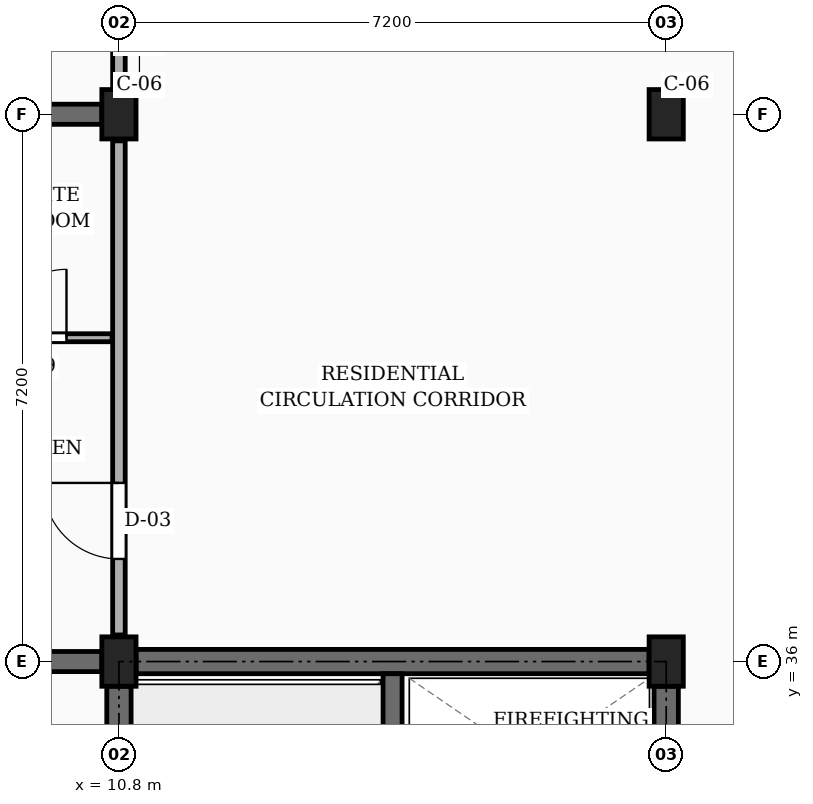
"""IFC4 building model, lengths in metres.
Left out: names, types, materials, properties, quantities, classifications, styles, units other than length and angle.
Written with IfcOpenShell. Run it as: python <this file> out.ifc"""

import sys

from ifc_helpers import new_model, si_unit, direction, frame, frame_2d, origin, origin_2d, place, context, subcontext, project, spatial, rectangle, extrude, element, fill, save


model = new_model("IFC4")
c1 = context("Model", 3, precision=1e-05, world=origin(), true_north=direction((0.0, 1.0)))
c2 = subcontext(c1, "Body", "Model", "MODEL_VIEW")
j1 = project(units=[si_unit("LENGTHUNIT", "METRE"), si_unit("PLANEANGLEUNIT", "RADIAN")], contexts=[c1])
p1 = place(None, origin())
s1 = spatial("IfcSite", under=j1, at=p1, CompositionType="ELEMENT")
p2 = place(p1, origin())
s2 = spatial("IfcBuilding", under=s1, at=p2, CompositionType="ELEMENT")
p3 = place(p2, frame((0.0, 0.0, 10.8)))
s3 = spatial("IfcBuildingStorey", under=s2, at=p3, CompositionType="ELEMENT", Elevation=10.8)
for number, where, z_axis, x_axis in (
    (1, (10.8, 36.0, 0.0), (0.0, 0.0, 1.0), (1.0, 0.0, 0.0)),
    (2, (10.8, 43.2, 0.0), (0.0, 0.0, 1.0), (1.0, 0.0, 0.0)),
    (3, (18.0, 36.0, 0.0), (0.0, 0.0, 1.0), (1.0, 0.0, 0.0)),
    (4, (18.0, 43.2, 0.0), (0.0, 0.0, 1.0), (1.0, 0.0, 0.0)),
):
    element("IfcColumn", number, at=place(p3, frame(where, z_axis=z_axis, x_axis=x_axis)), inside=s3, PredefinedType="COLUMN", context=c2, shape_type="SweptSolid", body=[
        extrude(rectangle(XDim=0.45, YDim=0.65, at=origin_2d()), origin(), (0.0, 0.0, 1.0), 3.15),
    ])
for number, where, z_axis, x_axis in (
    (5, (3.875, 36.0, 0.0), (0.0, 0.0, 1.0), (1.0, 0.0, 0.0)),
    (6, (3.875, 43.2, 0.0), (0.0, 0.0, 1.0), (1.0, 0.0, 0.0)),
):
    element("IfcWall", number, at=place(p3, frame(where, z_axis=z_axis, x_axis=x_axis)), inside=s3, PredefinedType="SOLIDWALL", context=c2, shape_type="SweptSolid", body=[
        extrude(rectangle(XDim=6.7, YDim=0.265, at=frame_2d((3.35, 0.0))), origin(), (0.0, 0.0, 1.0), 2.17),
    ])
p4 = place(p3, frame((10.8, 29.125, 0.0), z_axis=(0.0, 0.0, 1.0), x_axis=(0.0, 1.0, 0.0)))
e7 = element("IfcWall", 7, at=p4, inside=s3, PredefinedType="SHEAR", context=c2, shape_type="SweptSolid", body=[
    extrude(rectangle(XDim=6.55, YDim=0.32, at=frame_2d((3.275, 0.0))), origin(), (0.0, 0.0, 1.0), 2.87),
])
p5 = place(p3, frame((11.025, 36.0, 0.0), z_axis=(0.0, 0.0, 1.0), x_axis=(1.0, 0.0, 0.0)))
e8 = element("IfcWall", 8, at=p5, inside=s3, PredefinedType="SHEAR", context=c2, shape_type="SweptSolid", body=[
    extrude(rectangle(XDim=6.75, YDim=0.32, at=frame_2d((3.375, 0.0))), origin(), (0.0, 0.0, 1.0), 2.87),
])
p6 = place(p3, frame((18.0, 29.125, 0.0), z_axis=(0.0, 0.0, 1.0), x_axis=(0.0, 1.0, 0.0)))
e9 = element("IfcWall", 9, at=p6, inside=s3, PredefinedType="SHEAR", context=c2, shape_type="SweptSolid", body=[
    extrude(rectangle(XDim=6.55, YDim=0.32, at=frame_2d((3.275, 0.0))), origin(), (0.0, 0.0, 1.0), 2.87),
])
p7 = place(p6, frame((1.5, 0.0, 0.0)))
e10 = element("IfcOpeningElement", 10, at=p7, cuts=e9, PredefinedType="OPENING", context=c2, shape_type="SweptSolid", body=[
    extrude(rectangle(XDim=1.1, YDim=2.15, at=frame_2d((0.55, 1.075))), frame((0.0, 0.17, 0.0), z_axis=(0.0, -1.0, 0.0), x_axis=(1.0, 0.0, 0.0)), (0.0, 0.0, 1.0), 0.34),
])
p8 = place(p3, frame((14.4, 28.96, 0.0), z_axis=(0.0, 0.0, 1.0), x_axis=(0.0, 1.0, 0.0)))
e11 = element("IfcWall", 11, at=p8, inside=s3, PredefinedType="SHEAR", context=c2, shape_type="SweptSolid", body=[
    extrude(rectangle(XDim=6.88, YDim=0.25, at=frame_2d((3.44, 0.0))), origin(), (0.0, 0.0, 1.0), 2.87),
])
p9 = place(p8, frame((0.44, 0.0, 0.0)))
e12 = element("IfcOpeningElement", 12, at=p9, cuts=e11, PredefinedType="OPENING", context=c2, shape_type="SweptSolid", body=[
    extrude(rectangle(XDim=1.05, YDim=2.15, at=frame_2d((0.525, 1.075))), frame((0.0, 0.135, 0.0), z_axis=(0.0, -1.0, 0.0), x_axis=(1.0, 0.0, 0.0)), (0.0, 0.0, 1.0), 0.27),
])
p10 = place(p3, frame((10.8, 36.35, 0.0), z_axis=(0.0, 0.0, 1.0), x_axis=(0.0, 1.0, 0.0)))
e13 = element("IfcWall", 13, at=p10, inside=s3, PredefinedType="PARTITIONING", context=c2, shape_type="SweptSolid", body=[
    extrude(rectangle(XDim=6.5, YDim=0.165, at=frame_2d((3.25, 0.0))), origin(), (0.0, 0.0, 1.0), 2.22),
])
p11 = place(p10, frame((1.0, 0.0, 0.0)))
e14 = element("IfcOpeningElement", 14, at=p11, cuts=e13, PredefinedType="OPENING", context=c2, shape_type="SweptSolid", body=[
    extrude(rectangle(XDim=1.0, YDim=2.15, at=frame_2d((0.5, 1.075))), frame((0.0, 0.093, 0.0), z_axis=(0.0, -1.0, 0.0), x_axis=(1.0, 0.0, 0.0)), (0.0, 0.0, 1.0), 0.185),
])
p12 = place(p3, frame((10.8, 43.55, 0.0), z_axis=(0.0, 0.0, 1.0), x_axis=(0.0, 1.0, 0.0)))
e15 = element("IfcWall", 15, at=p12, inside=s3, PredefinedType="PARTITIONING", context=c2, shape_type="SweptSolid", body=[
    extrude(rectangle(XDim=6.5, YDim=0.165, at=frame_2d((3.25, 0.0))), origin(), (0.0, 0.0, 1.0), 2.22),
])
p13 = place(p12, frame((1.0, 0.0, 0.0)))
e16 = element("IfcOpeningElement", 16, at=p13, cuts=e15, PredefinedType="OPENING", context=c2, shape_type="SweptSolid", body=[
    extrude(rectangle(XDim=0.94, YDim=2.12, at=frame_2d((0.47, 1.06))), frame((0.0, 0.093, 0.0), z_axis=(0.0, -1.0, 0.0), x_axis=(1.0, 0.0, 0.0)), (0.0, 0.0, 1.0), 0.185),
])
p14 = place(p3, frame((8.61, 40.26, 0.0), z_axis=(0.0, 0.0, 1.0), x_axis=(1.0, 0.0, 0.0)))
e17 = element("IfcWall", 17, at=p14, inside=s3, PredefinedType="PARTITIONING", context=c2, shape_type="SweptSolid", body=[
    extrude(rectangle(XDim=2.1, YDim=0.105, at=frame_2d((1.05, 0.0))), origin(), (0.0, 0.0, 1.0), 2.305),
])
p15 = place(p14, frame((0.6, 0.0, 0.0)))
e18 = element("IfcOpeningElement", 18, at=p15, cuts=e17, PredefinedType="OPENING", context=c2, shape_type="SweptSolid", body=[
    extrude(rectangle(XDim=0.9, YDim=2.05, at=frame_2d((0.45, 1.025))), frame((0.0, 0.062, 0.0), z_axis=(0.0, -1.0, 0.0), x_axis=(1.0, 0.0, 0.0)), (0.0, 0.0, 1.0), 0.125),
])
p16 = place(p11, origin())
e19 = element("IfcDoor", 19, at=p16, inside=s3, OperationType="SINGLE_SWING_RIGHT", PredefinedType="DOOR", context=c2, shape_type="SweptSolid", body=[
    extrude(rectangle(XDim=1.0, YDim=2.15, at=frame_2d((0.5, 1.075))), frame((0.0, 0.025, 0.0), z_axis=(0.0, -1.0, 0.0), x_axis=(1.0, 0.0, 0.0)), (0.0, 0.0, 1.0), 0.05),
])
fill(e14, e19)
p17 = place(p15, origin())
e20 = element("IfcDoor", 20, at=p17, inside=s3, OperationType="SINGLE_SWING_RIGHT", PredefinedType="DOOR", context=c2, shape_type="SweptSolid", body=[
    extrude(rectangle(XDim=0.9, YDim=2.05, at=frame_2d((0.45, 1.025))), frame((0.0, 0.025, 0.0), z_axis=(0.0, -1.0, 0.0), x_axis=(1.0, 0.0, 0.0)), (0.0, 0.0, 1.0), 0.05),
])
fill(e18, e20)
save(model, sys.argv[1])
